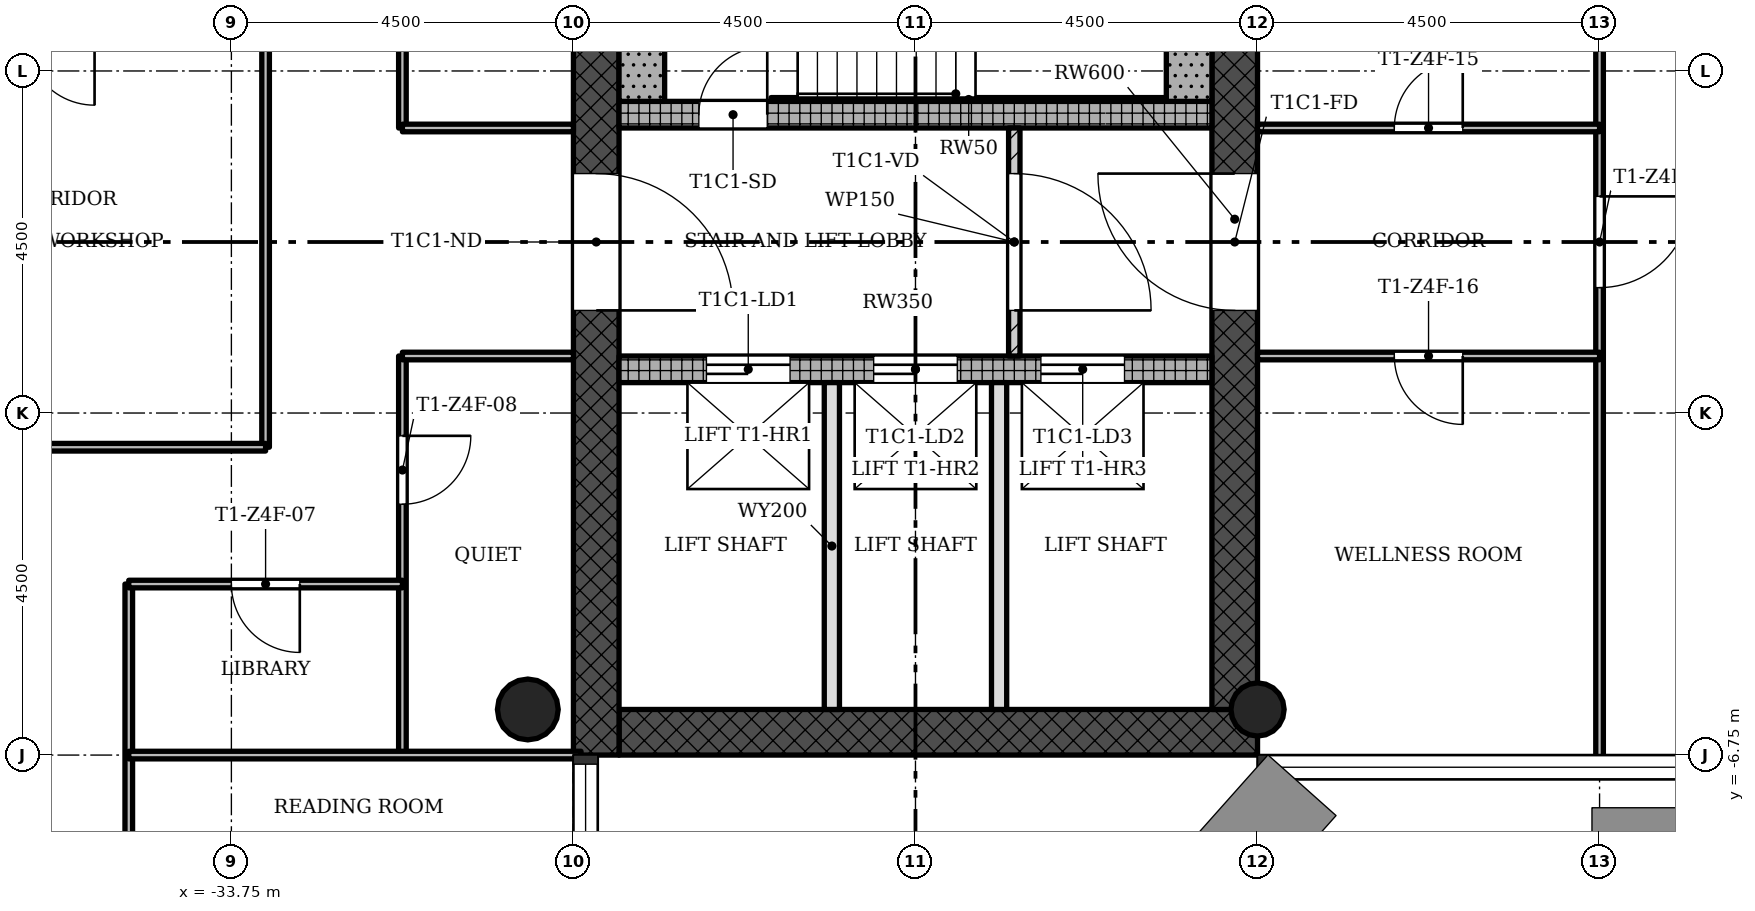
"""IFC4 building model, lengths in metres.
Left out: names, types, materials, properties, quantities, classifications, styles, units other than length and angle.
Written with IfcOpenShell. Run it as: python <this file> out.ifc"""

import sys

from ifc_helpers import new_model, si_unit, direction, frame, frame_2d, origin, origin_2d, place, context, subcontext, project, spatial, rectangle, hollow_circle, extrude, element, fill, save


model = new_model("IFC4")
c1 = context("Model", 3, precision=1e-05, world=origin(), true_north=direction((0.0, 1.0)))
c2 = subcontext(c1, "Body", "Model", "MODEL_VIEW")
j1 = project(units=[si_unit("LENGTHUNIT", "METRE"), si_unit("PLANEANGLEUNIT", "RADIAN")], contexts=[c1])
p1 = place(None, origin())
s1 = spatial("IfcSite", under=j1, at=p1, CompositionType="ELEMENT")
p2 = place(p1, origin())
s2 = spatial("IfcBuilding", under=s1, at=p2, CompositionType="ELEMENT")
p3 = place(p2, frame((0.0, 0.0, 216.4)))
s3 = spatial("IfcBuildingStorey", under=s2, at=p3, CompositionType="ELEMENT", Elevation=216.4)
p4 = place(p3, frame((-28.65, -6.45, 0.0), z_axis=(0.0, 0.0, 1.0), x_axis=(1.0, 0.0, 0.0)))
e1 = element("IfcWall", 1, at=p4, inside=s3, PredefinedType="SHEAR", context=c2, shape_type="SweptSolid", body=[
    extrude(rectangle(XDim=8.4, YDim=0.6, at=frame_2d((4.2, 0.0))), origin(), (0.0, 0.0, 1.0), 3.4),
])
p5 = place(p3, frame((-20.55, -6.15, 0.0), z_axis=(0.0, 0.0, 1.0), x_axis=(0.0, 1.0, 0.0)))
e2 = element("IfcWall", 2, at=p5, inside=s3, PredefinedType="SHEAR", context=c2, shape_type="SweptSolid", body=[
    extrude(rectangle(XDim=12.9, YDim=0.6, at=frame_2d((6.45, 0.0))), origin(), (0.0, 0.0, 1.0), 3.4),
])
p6 = place(p5, frame((5.25, 0.0, 0.0)))
e3 = element("IfcOpeningElement", 3, at=p6, cuts=e2, PredefinedType="OPENING", context=c2, shape_type="SweptSolid", body=[
    extrude(rectangle(XDim=1.8, YDim=2.1, at=frame_2d((0.9, 1.05))), frame((0.0, 0.31, 0.0), z_axis=(0.0, -1.0, 0.0), x_axis=(1.0, 0.0, 0.0)), (0.0, 0.0, 1.0), 0.62),
])
p7 = place(p3, frame((-28.95, 6.15, 0.0), z_axis=(0.0, 0.0, 1.0), x_axis=(0.0, -1.0, 0.0)))
e4 = element("IfcWall", 4, at=p7, inside=s3, PredefinedType="SHEAR", context=c2, shape_type="SweptSolid", body=[
    extrude(rectangle(XDim=12.9, YDim=0.6, at=frame_2d((6.45, 0.0))), origin(), (0.0, 0.0, 1.0), 3.4),
])
p8 = place(p7, frame((5.25, 0.0, 0.0)))
e5 = element("IfcOpeningElement", 5, at=p8, cuts=e4, PredefinedType="OPENING", context=c2, shape_type="SweptSolid", body=[
    extrude(rectangle(XDim=1.8, YDim=2.1, at=frame_2d((0.9, 1.05))), frame((0.0, 0.31, 0.0), z_axis=(0.0, -1.0, 0.0), x_axis=(1.0, 0.0, 0.0)), (0.0, 0.0, 1.0), 0.62),
])
p9 = place(p3, frame((-28.65, -1.675, 0.0), z_axis=(0.0, 0.0, 1.0), x_axis=(1.0, 0.0, 0.0)))
e6 = element("IfcWall", 6, at=p9, inside=s3, PredefinedType="SHEAR", context=c2, shape_type="SweptSolid", body=[
    extrude(rectangle(XDim=7.8, YDim=0.35, at=frame_2d((3.9, 0.0))), origin(), (0.0, 0.0, 1.0), 3.4),
])
p10 = place(p9, frame((1.15, 0.0, 0.0)))
e7 = element("IfcOpeningElement", 7, at=p10, cuts=e6, PredefinedType="OPENING", context=c2, shape_type="SweptSolid", body=[
    extrude(rectangle(XDim=1.1, YDim=2.1, at=frame_2d((0.55, 1.05))), frame((0.0, 0.185, 0.0), z_axis=(0.0, -1.0, 0.0), x_axis=(1.0, 0.0, 0.0)), (0.0, 0.0, 1.0), 0.37),
])
p11 = place(p9, frame((3.35, 0.0, 0.0)))
e8 = element("IfcOpeningElement", 8, at=p11, cuts=e6, PredefinedType="OPENING", context=c2, shape_type="SweptSolid", body=[
    extrude(rectangle(XDim=1.1, YDim=2.1, at=frame_2d((0.55, 1.05))), frame((0.0, 0.185, 0.0), z_axis=(0.0, -1.0, 0.0), x_axis=(1.0, 0.0, 0.0)), (0.0, 0.0, 1.0), 0.37),
])
p12 = place(p9, frame((5.55, 0.0, 0.0)))
e9 = element("IfcOpeningElement", 9, at=p12, cuts=e6, PredefinedType="OPENING", context=c2, shape_type="SweptSolid", body=[
    extrude(rectangle(XDim=1.1, YDim=2.1, at=frame_2d((0.55, 1.05))), frame((0.0, 0.185, 0.0), z_axis=(0.0, -1.0, 0.0), x_axis=(1.0, 0.0, 0.0)), (0.0, 0.0, 1.0), 0.37),
])
p13 = place(p3, frame((-28.65, 1.675, 0.0), z_axis=(0.0, 0.0, 1.0), x_axis=(1.0, 0.0, 0.0)))
e10 = element("IfcWall", 10, at=p13, inside=s3, PredefinedType="SHEAR", context=c2, shape_type="SweptSolid", body=[
    extrude(rectangle(XDim=7.8, YDim=0.35, at=frame_2d((3.9, 0.0))), origin(), (0.0, 0.0, 1.0), 3.4),
])
p14 = place(p13, frame((1.05, 0.0, 0.0)))
e11 = element("IfcOpeningElement", 11, at=p14, cuts=e10, PredefinedType="OPENING", context=c2, shape_type="SweptSolid", body=[
    extrude(rectangle(XDim=0.9, YDim=2.1, at=frame_2d((0.45, 1.05))), frame((0.0, 0.185, 0.0), z_axis=(0.0, -1.0, 0.0), x_axis=(1.0, 0.0, 0.0)), (0.0, 0.0, 1.0), 0.37),
])
p15 = place(p3, frame((-20.25, -6.15, 0.0), z_axis=(0.0, 0.0, 1.0), x_axis=(1.0, 0.0, 0.0)))
e12 = element("IfcColumn", 12, at=p15, inside=s3, PredefinedType="COLUMN", context=c2, shape_type="SweptSolid", body=[
    extrude(hollow_circle(Radius=0.35, WallThickness=0.025, at=origin_2d()), origin(), (0.0, 0.0, 1.0), 3.4),
])
p16 = place(p3, frame((-29.85, -6.15, 0.0), z_axis=(0.0, 0.0, 1.0), x_axis=(1.0, 0.0, 0.0)))
e13 = element("IfcColumn", 13, at=p16, inside=s3, PredefinedType="COLUMN", context=c2, shape_type="SweptSolid", body=[
    extrude(hollow_circle(Radius=0.4, WallThickness=0.028, at=origin_2d()), origin(), (0.0, 0.0, 1.0), 3.4),
])
p17 = place(p3, frame((-23.45, -1.5, 0.0), z_axis=(0.0, 0.0, 1.0), x_axis=(0.0, 1.0, 0.0)))
e14 = element("IfcWall", 14, at=p17, inside=s3, PredefinedType="PARTITIONING", context=c2, shape_type="SweptSolid", body=[
    extrude(rectangle(XDim=3.0, YDim=0.15, at=frame_2d((1.5, 0.0))), origin(), (0.0, 0.0, 1.0), 3.0),
])
p18 = place(p17, frame((0.6, 0.0, 0.0)))
e15 = element("IfcOpeningElement", 15, at=p18, cuts=e14, PredefinedType="OPENING", context=c2, shape_type="SweptSolid", body=[
    extrude(rectangle(XDim=1.8, YDim=2.1, at=frame_2d((0.9, 1.05))), frame((0.0, 0.085, 0.0), z_axis=(0.0, -1.0, 0.0), x_axis=(1.0, 0.0, 0.0)), (0.0, 0.0, 1.0), 0.17),
])
for number, where, z_axis, x_axis in (
    (16, (-25.85, -6.15, 0.0), (0.0, 0.0, 1.0), (0.0, 1.0, 0.0)),
    (17, (-23.65, -6.15, 0.0), (0.0, 0.0, 1.0), (0.0, 1.0, 0.0)),
):
    element("IfcWall", number, at=place(p3, frame(where, z_axis=z_axis, x_axis=x_axis)), inside=s3, PredefinedType="SOLIDWALL", context=c2, shape_type="SweptSolid", body=[
        extrude(rectangle(XDim=4.3, YDim=0.2, at=frame_2d((2.15, 0.0))), origin(), (0.0, 0.0, 1.0), 3.0),
    ])
p19 = place(p3, frame((-35.1, -8.55, 0.0), z_axis=(0.0, 0.0, 1.0), x_axis=(0.0, 1.0, 0.0)))
e18 = element("IfcWall", 18, at=p19, inside=s3, PredefinedType="PARTITIONING", context=c2, shape_type="SweptSolid", body=[
    extrude(rectangle(XDim=4.05, YDim=0.1, at=frame_2d((2.025, 0.0))), origin(), (0.0, 0.0, 1.0), 3.0),
])
p20 = place(p3, frame((-33.3, -2.7, 0.0), z_axis=(0.0, 0.0, 1.0), x_axis=(0.0, 1.0, 0.0)))
e19 = element("IfcWall", 19, at=p20, inside=s3, PredefinedType="PARTITIONING", context=c2, shape_type="SweptSolid", body=[
    extrude(rectangle(XDim=5.4, YDim=0.1, at=frame_2d((2.7, 0.0))), origin(), (0.0, 0.0, 1.0), 3.0),
])
p21 = place(p3, frame((-31.5, -6.75, 0.0), z_axis=(0.0, 0.0, 1.0), x_axis=(0.0, 1.0, 0.0)))
e20 = element("IfcWall", 20, at=p21, inside=s3, PredefinedType="PARTITIONING", context=c2, shape_type="SweptSolid", body=[
    extrude(rectangle(XDim=5.25, YDim=0.1, at=frame_2d((2.625, 0.0))), origin(), (0.0, 0.0, 1.0), 3.0),
])
p22 = place(p21, frame((3.3, 0.0, 0.0)))
e21 = element("IfcOpeningElement", 21, at=p22, cuts=e20, PredefinedType="OPENING", context=c2, shape_type="SweptSolid", body=[
    extrude(rectangle(XDim=0.9, YDim=2.1, at=frame_2d((0.45, 1.05))), frame((0.0, 0.06, 0.0), z_axis=(0.0, -1.0, 0.0), x_axis=(1.0, 0.0, 0.0)), (0.0, 0.0, 1.0), 0.12),
])
p23 = place(p3, frame((-31.5, 1.5, 0.0), z_axis=(0.0, 0.0, 1.0), x_axis=(0.0, 1.0, 0.0)))
e22 = element("IfcWall", 22, at=p23, inside=s3, PredefinedType="PARTITIONING", context=c2, shape_type="SweptSolid", body=[
    extrude(rectangle(XDim=3.0, YDim=0.1, at=frame_2d((1.5, 0.0))), origin(), (0.0, 0.0, 1.0), 3.0),
])
p24 = place(p3, frame((-15.75, -6.85, 0.0), z_axis=(0.0, 0.0, 1.0), x_axis=(0.0, 1.0, 0.0)))
e23 = element("IfcWall", 23, at=p24, inside=s3, PredefinedType="PARTITIONING", context=c2, shape_type="SweptSolid", body=[
    extrude(rectangle(XDim=13.7, YDim=0.1, at=frame_2d((6.85, 0.0))), origin(), (0.0, 0.0, 1.0), 3.0),
])
p25 = place(p24, frame((6.25, 0.0, 0.0)))
e24 = element("IfcOpeningElement", 24, at=p25, cuts=e23, PredefinedType="OPENING", context=c2, shape_type="SweptSolid", body=[
    extrude(rectangle(XDim=1.2, YDim=2.1, at=frame_2d((0.6, 1.05))), frame((0.0, 0.06, 0.0), z_axis=(0.0, -1.0, 0.0), x_axis=(1.0, 0.0, 0.0)), (0.0, 0.0, 1.0), 0.12),
])
p26 = place(p3, frame((-35.1, -6.75, 0.0), z_axis=(0.0, 0.0, 1.0), x_axis=(1.0, 0.0, 0.0)))
e25 = element("IfcWall", 25, at=p26, inside=s3, PredefinedType="PARTITIONING", context=c2, shape_type="SweptSolid", body=[
    extrude(rectangle(XDim=5.95, YDim=0.1, at=frame_2d((2.975, 0.0))), origin(), (0.0, 0.0, 1.0), 3.0),
])
p27 = place(p3, frame((-35.1, -4.5, 0.0), z_axis=(0.0, 0.0, 1.0), x_axis=(1.0, 0.0, 0.0)))
e26 = element("IfcWall", 26, at=p27, inside=s3, PredefinedType="PARTITIONING", context=c2, shape_type="SweptSolid", body=[
    extrude(rectangle(XDim=3.6, YDim=0.1, at=frame_2d((1.8, 0.0))), origin(), (0.0, 0.0, 1.0), 3.0),
])
p28 = place(p27, frame((1.35, 0.0, 0.0)))
e27 = element("IfcOpeningElement", 27, at=p28, cuts=e26, PredefinedType="OPENING", context=c2, shape_type="SweptSolid", body=[
    extrude(rectangle(XDim=0.9, YDim=2.1, at=frame_2d((0.45, 1.05))), frame((0.0, 0.06, 0.0), z_axis=(0.0, -1.0, 0.0), x_axis=(1.0, 0.0, 0.0)), (0.0, 0.0, 1.0), 0.12),
])
p29 = place(p3, frame((-38.7, -2.7, 0.0), z_axis=(0.0, 0.0, 1.0), x_axis=(1.0, 0.0, 0.0)))
e28 = element("IfcWall", 28, at=p29, inside=s3, PredefinedType="PARTITIONING", context=c2, shape_type="SweptSolid", body=[
    extrude(rectangle(XDim=5.4, YDim=0.1, at=frame_2d((2.7, 0.0))), origin(), (0.0, 0.0, 1.0), 3.0),
])
p30 = place(p3, frame((-31.5, -1.5, 0.0), z_axis=(0.0, 0.0, 1.0), x_axis=(1.0, 0.0, 0.0)))
e29 = element("IfcWall", 29, at=p30, inside=s3, PredefinedType="PARTITIONING", context=c2, shape_type="SweptSolid", body=[
    extrude(rectangle(XDim=2.25, YDim=0.1, at=frame_2d((1.125, 0.0))), origin(), (0.0, 0.0, 1.0), 3.0),
])
p31 = place(p3, frame((-20.25, -1.5, 0.0), z_axis=(0.0, 0.0, 1.0), x_axis=(1.0, 0.0, 0.0)))
e30 = element("IfcWall", 30, at=p31, inside=s3, PredefinedType="PARTITIONING", context=c2, shape_type="SweptSolid", body=[
    extrude(rectangle(XDim=4.5, YDim=0.1, at=frame_2d((2.25, 0.0))), origin(), (0.0, 0.0, 1.0), 3.0),
])
p32 = place(p31, frame((1.8, 0.0, 0.0)))
e31 = element("IfcOpeningElement", 31, at=p32, cuts=e30, PredefinedType="OPENING", context=c2, shape_type="SweptSolid", body=[
    extrude(rectangle(XDim=0.9, YDim=2.1, at=frame_2d((0.45, 1.05))), frame((0.0, 0.06, 0.0), z_axis=(0.0, -1.0, 0.0), x_axis=(1.0, 0.0, 0.0)), (0.0, 0.0, 1.0), 0.12),
])
p33 = place(p3, frame((-31.5, 1.5, 0.0), z_axis=(0.0, 0.0, 1.0), x_axis=(1.0, 0.0, 0.0)))
e32 = element("IfcWall", 32, at=p33, inside=s3, PredefinedType="PARTITIONING", context=c2, shape_type="SweptSolid", body=[
    extrude(rectangle(XDim=2.25, YDim=0.1, at=frame_2d((1.125, 0.0))), origin(), (0.0, 0.0, 1.0), 3.0),
])
p34 = place(p3, frame((-20.25, 1.5, 0.0), z_axis=(0.0, 0.0, 1.0), x_axis=(1.0, 0.0, 0.0)))
e33 = element("IfcWall", 33, at=p34, inside=s3, PredefinedType="PARTITIONING", context=c2, shape_type="SweptSolid", body=[
    extrude(rectangle(XDim=4.5, YDim=0.1, at=frame_2d((2.25, 0.0))), origin(), (0.0, 0.0, 1.0), 3.0),
])
p35 = place(p34, frame((1.8, 0.0, 0.0)))
e34 = element("IfcOpeningElement", 34, at=p35, cuts=e33, PredefinedType="OPENING", context=c2, shape_type="SweptSolid", body=[
    extrude(rectangle(XDim=0.9, YDim=2.1, at=frame_2d((0.45, 1.05))), frame((0.0, 0.06, 0.0), z_axis=(0.0, -1.0, 0.0), x_axis=(1.0, 0.0, 0.0)), (0.0, 0.0, 1.0), 0.12),
])
for number, where, z_axis, x_axis in (
    (35, (-21.15, 1.85, 0.0), (0.0, 0.0, 1.0), (0.0, 1.0, 0.0)),
    (36, (-28.35, 1.85, 0.0), (0.0, 0.0, 1.0), (0.0, 1.0, 0.0)),
):
    element("IfcWall", number, at=place(p3, frame(where, z_axis=z_axis, x_axis=x_axis)), inside=s3, PredefinedType="SHEAR", context=c2, shape_type="SweptSolid", body=[
        extrude(rectangle(XDim=4.3, YDim=0.6, at=frame_2d((2.15, 0.0))), origin(), (0.0, 0.0, 1.0), 3.4),
    ])
p36 = place(p3, frame((-26.65, 1.875, 0.0), z_axis=(0.0, 0.0, 1.0), x_axis=(1.0, 0.0, 0.0)))
e37 = element("IfcWall", 37, at=p36, inside=s3, PredefinedType="SHEAR", context=c2, shape_type="SweptSolid", body=[
    extrude(rectangle(XDim=5.2, YDim=0.05, at=frame_2d((2.6, 0.0))), origin(), (0.0, 0.0, 1.0), 3.4),
])
p37 = place(p18, origin())
e38 = element("IfcDoor", 38, at=p37, inside=s3, OperationType="SINGLE_SWING_LEFT", PredefinedType="DOOR", context=c2, shape_type="SweptSolid", body=[
    extrude(rectangle(XDim=1.8, YDim=2.1, at=frame_2d((0.9, 1.05))), frame((0.0, 0.025, 0.0), z_axis=(0.0, -1.0, 0.0), x_axis=(1.0, 0.0, 0.0)), (0.0, 0.0, 1.0), 0.05),
])
fill(e15, e38)
p38 = place(p28, origin())
e39 = element("IfcDoor", 39, at=p38, inside=s3, OperationType="SINGLE_SWING_RIGHT", PredefinedType="DOOR", context=c2, shape_type="SweptSolid", body=[
    extrude(rectangle(XDim=0.9, YDim=2.1, at=frame_2d((0.45, 1.05))), frame((0.0, 0.025, 0.0), z_axis=(0.0, -1.0, 0.0), x_axis=(1.0, 0.0, 0.0)), (0.0, 0.0, 1.0), 0.05),
])
fill(e27, e39)
p39 = place(p22, origin())
e40 = element("IfcDoor", 40, at=p39, inside=s3, OperationType="SINGLE_SWING_RIGHT", PredefinedType="DOOR", context=c2, shape_type="SweptSolid", body=[
    extrude(rectangle(XDim=0.9, YDim=2.1, at=frame_2d((0.45, 1.05))), frame((0.0, 0.025, 0.0), z_axis=(0.0, -1.0, 0.0), x_axis=(1.0, 0.0, 0.0)), (0.0, 0.0, 1.0), 0.05),
])
fill(e21, e40)
p40 = place(p35, origin())
e41 = element("IfcDoor", 41, at=p40, inside=s3, OperationType="SINGLE_SWING_LEFT", PredefinedType="DOOR", context=c2, shape_type="SweptSolid", body=[
    extrude(rectangle(XDim=0.9, YDim=2.1, at=frame_2d((0.45, 1.05))), frame((0.0, 0.025, 0.0), z_axis=(0.0, -1.0, 0.0), x_axis=(1.0, 0.0, 0.0)), (0.0, 0.0, 1.0), 0.05),
])
fill(e34, e41)
p41 = place(p32, origin())
e42 = element("IfcDoor", 42, at=p41, inside=s3, OperationType="SINGLE_SWING_RIGHT", PredefinedType="DOOR", context=c2, shape_type="SweptSolid", body=[
    extrude(rectangle(XDim=0.9, YDim=2.1, at=frame_2d((0.45, 1.05))), frame((0.0, 0.025, 0.0), z_axis=(0.0, -1.0, 0.0), x_axis=(1.0, 0.0, 0.0)), (0.0, 0.0, 1.0), 0.05),
])
fill(e31, e42)
p42 = place(p25, origin())
e43 = element("IfcDoor", 43, at=p42, inside=s3, OperationType="SINGLE_SWING_RIGHT", PredefinedType="DOOR", context=c2, shape_type="SweptSolid", body=[
    extrude(rectangle(XDim=1.2, YDim=2.1, at=frame_2d((0.6, 1.05))), frame((0.0, 0.025, 0.0), z_axis=(0.0, -1.0, 0.0), x_axis=(1.0, 0.0, 0.0)), (0.0, 0.0, 1.0), 0.05),
])
fill(e24, e43)
p43 = place(p14, origin())
e44 = element("IfcDoor", 44, at=p43, inside=s3, OperationType="SINGLE_SWING_LEFT", PredefinedType="DOOR", context=c2, shape_type="SweptSolid", body=[
    extrude(rectangle(XDim=0.9, YDim=2.1, at=frame_2d((0.45, 1.05))), frame((0.0, 0.025, 0.0), z_axis=(0.0, -1.0, 0.0), x_axis=(1.0, 0.0, 0.0)), (0.0, 0.0, 1.0), 0.05),
])
fill(e11, e44)
p44 = place(p10, origin())
e45 = element("IfcDoor", 45, at=p44, inside=s3, OperationType="SLIDING_TO_LEFT", PredefinedType="DOOR", context=c2, shape_type="SweptSolid", body=[
    extrude(rectangle(XDim=1.1, YDim=2.1, at=frame_2d((0.55, 1.05))), frame((0.0, 0.025, 0.0), z_axis=(0.0, -1.0, 0.0), x_axis=(1.0, 0.0, 0.0)), (0.0, 0.0, 1.0), 0.05),
])
fill(e7, e45)
p45 = place(p11, origin())
e46 = element("IfcDoor", 46, at=p45, inside=s3, OperationType="SLIDING_TO_LEFT", PredefinedType="DOOR", context=c2, shape_type="SweptSolid", body=[
    extrude(rectangle(XDim=1.1, YDim=2.1, at=frame_2d((0.55, 1.05))), frame((0.0, 0.025, 0.0), z_axis=(0.0, -1.0, 0.0), x_axis=(1.0, 0.0, 0.0)), (0.0, 0.0, 1.0), 0.05),
])
fill(e8, e46)
p46 = place(p12, origin())
e47 = element("IfcDoor", 47, at=p46, inside=s3, OperationType="SLIDING_TO_LEFT", PredefinedType="DOOR", context=c2, shape_type="SweptSolid", body=[
    extrude(rectangle(XDim=1.1, YDim=2.1, at=frame_2d((0.55, 1.05))), frame((0.0, 0.025, 0.0), z_axis=(0.0, -1.0, 0.0), x_axis=(1.0, 0.0, 0.0)), (0.0, 0.0, 1.0), 0.05),
])
fill(e9, e47)
p47 = place(p8, origin())
e48 = element("IfcDoor", 48, at=p47, inside=s3, OperationType="SINGLE_SWING_LEFT", PredefinedType="DOOR", context=c2, shape_type="SweptSolid", body=[
    extrude(rectangle(XDim=1.8, YDim=2.1, at=frame_2d((0.9, 1.05))), frame((0.0, 0.025, 0.0), z_axis=(0.0, -1.0, 0.0), x_axis=(1.0, 0.0, 0.0)), (0.0, 0.0, 1.0), 0.05),
])
fill(e5, e48)
p48 = place(p6, origin())
e49 = element("IfcDoor", 49, at=p48, inside=s3, OperationType="SINGLE_SWING_LEFT", PredefinedType="DOOR", context=c2, shape_type="SweptSolid", body=[
    extrude(rectangle(XDim=1.8, YDim=2.1, at=frame_2d((0.9, 1.05))), frame((0.0, 0.025, 0.0), z_axis=(0.0, -1.0, 0.0), x_axis=(1.0, 0.0, 0.0)), (0.0, 0.0, 1.0), 0.05),
])
fill(e3, e49)
save(model, sys.argv[1])
